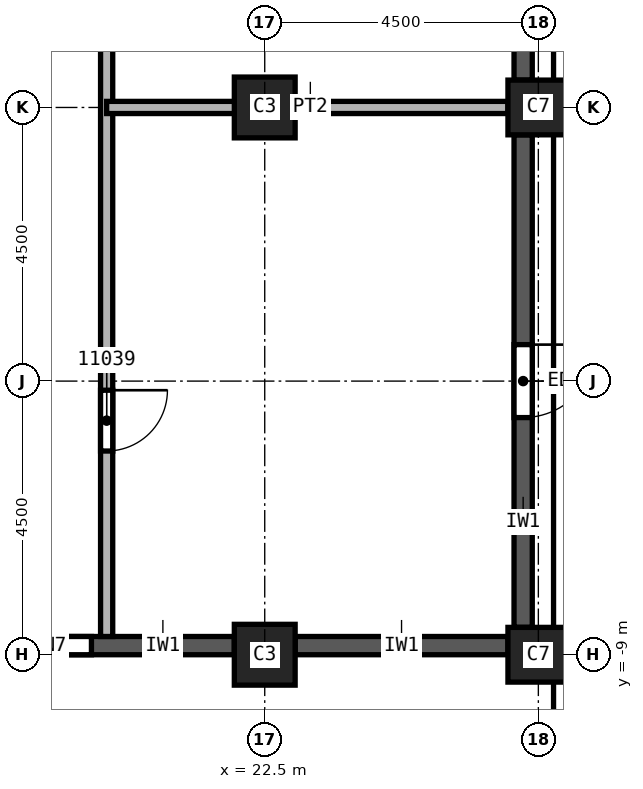
"""IFC4 building model, lengths in metres.
Left out: names, types, materials, properties, quantities, classifications, styles, units other than length and angle.
Written with IfcOpenShell. Run it as: python <this file> out.ifc"""

import sys

from ifc_helpers import new_model, si_unit, direction, frame, frame_2d, origin, origin_2d, place, context, subcontext, project, spatial, rectangle, extrude, element, fill, save


model = new_model("IFC4")
c1 = context("Model", 3, precision=1e-05, world=origin(), true_north=direction((0.0, 1.0)))
c2 = subcontext(c1, "Body", "Model", "MODEL_VIEW")
j1 = project(units=[si_unit("LENGTHUNIT", "METRE"), si_unit("PLANEANGLEUNIT", "RADIAN")], contexts=[c1])
p1 = place(None, origin())
s1 = spatial("IfcSite", under=j1, at=p1, CompositionType="ELEMENT")
p2 = place(p1, origin())
s2 = spatial("IfcBuilding", under=s1, at=p2, CompositionType="ELEMENT")
p3 = place(p2, frame((0.0, 0.0, 184.0)))
s3 = spatial("IfcBuildingStorey", under=s2, at=p3, CompositionType="ELEMENT", Elevation=184.0)
for number, where, z_axis, x_axis in (
    (1, (22.5, 0.0, 0.0), (0.0, 0.0, 1.0), (1.0, 0.0, 0.0)),
    (2, (22.5, -9.0, 0.0), (0.0, 0.0, 1.0), (1.0, 0.0, 0.0)),
):
    element("IfcColumn", number, at=place(p3, frame(where, z_axis=z_axis, x_axis=x_axis)), inside=s3, PredefinedType="COLUMN", context=c2, shape_type="SweptSolid", body=[
        extrude(rectangle(XDim=1.0, YDim=1.0, at=origin_2d()), origin(), (0.0, 0.0, 1.0), 3.72),
    ])
for number, where, z_axis, x_axis in (
    (3, (27.0, 0.0, 0.0), (0.0, 0.0, 1.0), (0.0, 1.0, 0.0)),
    (4, (27.0, -9.0, 0.0), (0.0, 0.0, 1.0), (0.0, 1.0, 0.0)),
):
    element("IfcColumn", number, at=place(p3, frame(where, z_axis=z_axis, x_axis=x_axis)), inside=s3, PredefinedType="COLUMN", context=c2, shape_type="SweptSolid", body=[
        extrude(rectangle(XDim=0.9, YDim=1.0, at=origin_2d()), origin(), (0.0, 0.0, 1.0), 3.72),
    ])
p4 = place(p3, frame((26.75, -0.45, 0.0), z_axis=(0.0, 0.0, 1.0), x_axis=(0.0, -1.0, 0.0)))
e5 = element("IfcWall", 5, at=p4, inside=s3, PredefinedType="SOLIDWALL", context=c2, shape_type="SweptSolid", body=[
    extrude(rectangle(XDim=8.1, YDim=0.3, at=frame_2d((4.05, 0.0))), origin(), (0.0, 0.0, 1.0), 3.12),
])
p5 = place(p4, frame((3.45, 0.0, 0.0)))
e6 = element("IfcOpeningElement", 6, at=p5, cuts=e5, PredefinedType="OPENING", context=c2, shape_type="SweptSolid", body=[
    extrude(rectangle(XDim=1.2, YDim=2.4, at=frame_2d((0.6, 1.2))), frame((0.0, 0.15, 0.0), z_axis=(0.0, -1.0, 0.0), x_axis=(1.0, 0.0, 0.0)), (0.0, 0.0, 1.0), 0.3),
])
p6 = place(p3, frame((26.75, 0.45, 0.0), z_axis=(0.0, 0.0, 1.0), x_axis=(0.0, 1.0, 0.0)))
e7 = element("IfcWall", 7, at=p6, inside=s3, PredefinedType="SOLIDWALL", context=c2, shape_type="SweptSolid", body=[
    extrude(rectangle(XDim=8.1, YDim=0.3, at=frame_2d((4.05, 0.0))), origin(), (0.0, 0.0, 1.0), 3.12),
])
p7 = place(p6, frame((0.825, 0.0, 0.8)))
e8 = element("IfcOpeningElement", 8, at=p7, cuts=e7, PredefinedType="OPENING", context=c2, shape_type="SweptSolid", body=[
    extrude(rectangle(XDim=2.4, YDim=1.95, at=frame_2d((1.2, 0.975))), frame((0.0, 0.15, 0.0), z_axis=(0.0, -1.0, 0.0), x_axis=(1.0, 0.0, 0.0)), (0.0, 0.0, 1.0), 0.3),
])
p8 = place(p6, frame((4.988, 0.0, 0.8)))
e9 = element("IfcOpeningElement", 9, at=p8, cuts=e7, PredefinedType="OPENING", context=c2, shape_type="SweptSolid", body=[
    extrude(rectangle(XDim=1.0, YDim=1.95, at=frame_2d((0.5, 0.975))), frame((0.0, 0.15, 0.0), z_axis=(0.0, -1.0, 0.0), x_axis=(1.0, 0.0, 0.0)), (0.0, 0.0, 1.0), 0.3),
])
p9 = place(p6, frame((6.587, 0.0, 0.8)))
e10 = element("IfcOpeningElement", 10, at=p9, cuts=e7, PredefinedType="OPENING", context=c2, shape_type="SweptSolid", body=[
    extrude(rectangle(XDim=0.6, YDim=1.95, at=frame_2d((0.3, 0.975))), frame((0.0, 0.15, 0.0), z_axis=(0.0, -1.0, 0.0), x_axis=(1.0, 0.0, 0.0)), (0.0, 0.0, 1.0), 0.3),
])
p10 = place(p3, frame((13.525, -8.85, 0.0), z_axis=(0.0, 0.0, 1.0), x_axis=(1.0, 0.0, 0.0)))
e11 = element("IfcWall", 11, at=p10, inside=s3, PredefinedType="SOLIDWALL", context=c2, shape_type="SweptSolid", body=[
    extrude(rectangle(XDim=8.475, YDim=0.3, at=frame_2d((4.238, 0.0))), origin(), (0.0, 0.0, 1.0), 3.12),
])
p11 = place(p10, frame((0.825, 0.0, 0.8)))
e12 = element("IfcOpeningElement", 12, at=p11, cuts=e11, PredefinedType="OPENING", context=c2, shape_type="SweptSolid", body=[
    extrude(rectangle(XDim=1.8, YDim=1.95, at=frame_2d((0.9, 0.975))), frame((0.0, 0.15, 0.0), z_axis=(0.0, -1.0, 0.0), x_axis=(1.0, 0.0, 0.0)), (0.0, 0.0, 1.0), 0.3),
])
p12 = place(p10, frame((4.725, 0.0, 0.8)))
e13 = element("IfcOpeningElement", 13, at=p12, cuts=e11, PredefinedType="OPENING", context=c2, shape_type="SweptSolid", body=[
    extrude(rectangle(XDim=1.4, YDim=1.95, at=frame_2d((0.7, 0.975))), frame((0.0, 0.15, 0.0), z_axis=(0.0, -1.0, 0.0), x_axis=(1.0, 0.0, 0.0)), (0.0, 0.0, 1.0), 0.3),
])
p13 = place(p3, frame((23.0, -8.85, 0.0), z_axis=(0.0, 0.0, 1.0), x_axis=(1.0, 0.0, 0.0)))
e14 = element("IfcWall", 14, at=p13, inside=s3, PredefinedType="SOLIDWALL", context=c2, shape_type="SweptSolid", body=[
    extrude(rectangle(XDim=3.5, YDim=0.3, at=frame_2d((1.75, 0.0))), origin(), (0.0, 0.0, 1.0), 3.12),
])
p14 = place(p3, frame((19.9, 22.4, 0.0), z_axis=(0.0, 0.0, 1.0), x_axis=(0.0, -1.0, 0.0)))
e15 = element("IfcWall", 15, at=p14, inside=s3, PredefinedType="PARTITIONING", context=c2, shape_type="SweptSolid", body=[
    extrude(rectangle(XDim=31.1, YDim=0.2, at=frame_2d((15.55, 0.0))), origin(), (0.0, 0.0, 1.0), 3.72),
])
p15 = place(p14, frame((15.8, 0.0, 0.0)))
e16 = element("IfcOpeningElement", 16, at=p15, cuts=e15, PredefinedType="OPENING", context=c2, shape_type="SweptSolid", body=[
    extrude(rectangle(XDim=1.0, YDim=2.1, at=frame_2d((0.5, 1.05))), frame((0.0, 0.1, 0.0), z_axis=(0.0, -1.0, 0.0), x_axis=(1.0, 0.0, 0.0)), (0.0, 0.0, 1.0), 0.2),
])
p16 = place(p14, frame((14.45, 0.0, 0.0)))
e17 = element("IfcOpeningElement", 17, at=p16, cuts=e15, PredefinedType="OPENING", context=c2, shape_type="SweptSolid", body=[
    extrude(rectangle(XDim=1.0, YDim=2.1, at=frame_2d((0.5, 1.05))), frame((0.0, 0.1, 0.0), z_axis=(0.0, -1.0, 0.0), x_axis=(1.0, 0.0, 0.0)), (0.0, 0.0, 1.0), 0.2),
])
p17 = place(p14, frame((7.0, 0.0, 0.0)))
e18 = element("IfcOpeningElement", 18, at=p17, cuts=e15, PredefinedType="OPENING", context=c2, shape_type="SweptSolid", body=[
    extrude(rectangle(XDim=1.0, YDim=2.1, at=frame_2d((0.5, 1.05))), frame((0.0, 0.1, 0.0), z_axis=(0.0, -1.0, 0.0), x_axis=(1.0, 0.0, 0.0)), (0.0, 0.0, 1.0), 0.2),
])
p18 = place(p14, frame((27.05, 0.0, 0.0)))
e19 = element("IfcOpeningElement", 19, at=p18, cuts=e15, PredefinedType="OPENING", context=c2, shape_type="SweptSolid", body=[
    extrude(rectangle(XDim=1.0, YDim=2.1, at=frame_2d((0.5, 1.05))), frame((0.0, 0.1, 0.0), z_axis=(0.0, -1.0, 0.0), x_axis=(1.0, 0.0, 0.0)), (0.0, 0.0, 1.0), 0.2),
])
p19 = place(p3, frame((26.5, 0.0, 0.0), z_axis=(0.0, 0.0, 1.0), x_axis=(-1.0, 0.0, 0.0)))
e20 = element("IfcWall", 20, at=p19, inside=s3, PredefinedType="PARTITIONING", context=c2, shape_type="SweptSolid", body=[
    extrude(rectangle(XDim=6.6, YDim=0.2, at=frame_2d((3.3, 0.0))), origin(), (0.0, 0.0, 1.0), 3.72),
])
p20 = place(p5, origin())
e21 = element("IfcDoor", 21, at=p20, inside=s3, OperationType="SINGLE_SWING_LEFT", PredefinedType="DOOR", context=c2, shape_type="SweptSolid", body=[
    extrude(rectangle(XDim=1.2, YDim=2.4, at=frame_2d((0.6, 1.2))), frame((0.0, 0.025, 0.0), z_axis=(0.0, -1.0, 0.0), x_axis=(1.0, 0.0, 0.0)), (0.0, 0.0, 1.0), 0.05),
])
fill(e6, e21)
p21 = place(p18, origin())
e22 = element("IfcDoor", 22, at=p21, inside=s3, OperationType="SINGLE_SWING_RIGHT", PredefinedType="DOOR", context=c2, shape_type="SweptSolid", body=[
    extrude(rectangle(XDim=1.0, YDim=2.1, at=frame_2d((0.5, 1.05))), frame((0.0, 0.025, 0.0), z_axis=(0.0, -1.0, 0.0), x_axis=(1.0, 0.0, 0.0)), (0.0, 0.0, 1.0), 0.05),
])
fill(e19, e22)
p22 = place(p12, origin())
e23 = element("IfcWindow", 23, at=p22, inside=s3, PartitioningType="SINGLE_PANEL", PredefinedType="WINDOW", context=c2, shape_type="SweptSolid", body=[
    extrude(rectangle(XDim=1.4, YDim=1.95, at=frame_2d((0.7, 0.975))), frame((0.0, 0.03, 0.0), z_axis=(0.0, -1.0, 0.0), x_axis=(1.0, 0.0, 0.0)), (0.0, 0.0, 1.0), 0.06),
])
fill(e13, e23)
save(model, sys.argv[1])
